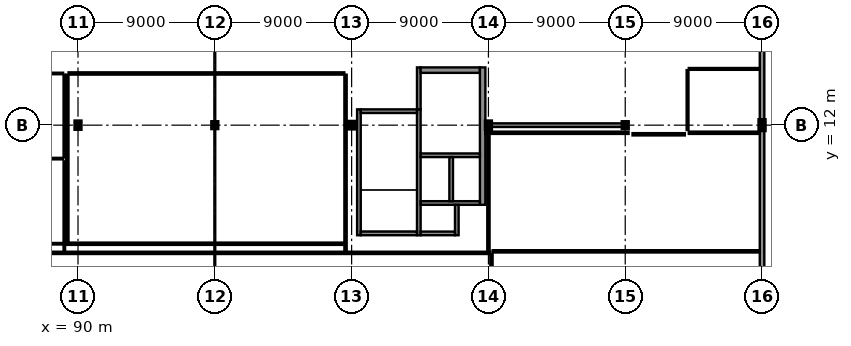
"""IFC4 building model, lengths in metres.
Left out: names, types, materials, properties, quantities, classifications, styles, units other than length and angle.
Written with IfcOpenShell. Run it as: python <this file> out.ifc"""

import sys

from ifc_helpers import new_model, si_unit, direction, frame, frame_2d, origin, origin_2d, place, context, subcontext, project, spatial, rectangle, i_section, extrude, element, fill, save


model = new_model("IFC4")
c1 = context("Model", 3, precision=1e-05, world=origin(), true_north=direction((0.0, 1.0)))
c2 = subcontext(c1, "Body", "Model", "MODEL_VIEW")
j1 = project(units=[si_unit("LENGTHUNIT", "METRE"), si_unit("PLANEANGLEUNIT", "RADIAN")], contexts=[c1])
p1 = place(None, origin())
s1 = spatial("IfcSite", under=j1, at=p1, CompositionType="ELEMENT")
p2 = place(p1, origin())
s2 = spatial("IfcBuilding", under=s1, at=p2, CompositionType="ELEMENT")
p3 = place(p2, frame((0.0, 0.0, 9.9)))
s3 = spatial("IfcBuildingStorey", under=s2, at=p3, CompositionType="ELEMENT", Elevation=9.9)
p4 = place(p3, frame((90.0, 12.0, 0.0), z_axis=(0.0, 0.0, 1.0), x_axis=(1.0, 0.0, 0.0)))
e1 = element("IfcColumn", 1, at=p4, inside=s3, PredefinedType="COLUMN", context=c2, shape_type="SweptSolid", body=[
    extrude(i_section(OverallWidth=0.3, OverallDepth=0.45, WebThickness=0.014, FlangeThickness=0.026, at=origin_2d()), origin(), (0.0, 0.0, 1.0), 4.5),
])
p5 = place(p3, frame((99.0, 12.0, 0.0), z_axis=(0.0, 0.0, 1.0), x_axis=(1.0, 0.0, 0.0)))
e2 = element("IfcColumn", 2, at=p5, inside=s3, PredefinedType="COLUMN", context=c2, shape_type="SweptSolid", body=[
    extrude(i_section(OverallWidth=0.3, OverallDepth=0.36, WebThickness=0.012, FlangeThickness=0.022, at=origin_2d()), origin(), (0.0, 0.0, 1.0), 4.5),
])
p6 = place(p3, frame((108.0, 12.0, 0.0), z_axis=(0.0, 0.0, 1.0), x_axis=(1.0, 0.0, 0.0)))
e3 = element("IfcColumn", 3, at=p6, inside=s3, PredefinedType="COLUMN", context=c2, shape_type="SweptSolid", body=[
    extrude(i_section(OverallWidth=0.3, OverallDepth=0.4, WebThickness=0.013, FlangeThickness=0.024, at=origin_2d()), origin(), (0.0, 0.0, 1.0), 4.5),
])
p7 = place(p3, frame((117.0, 12.0, 0.0), z_axis=(0.0, 0.0, 1.0), x_axis=(0.0, 1.0, 0.0)))
e4 = element("IfcColumn", 4, at=p7, inside=s3, PredefinedType="COLUMN", context=c2, shape_type="SweptSolid", body=[
    extrude(i_section(OverallWidth=0.3, OverallDepth=0.45, WebThickness=0.014, FlangeThickness=0.026, at=origin_2d()), origin(), (0.0, 0.0, 1.0), 4.5),
])
p8 = place(p3, frame((126.0, 12.0, 0.0), z_axis=(0.0, 0.0, 1.0), x_axis=(1.0, 0.0, 0.0)))
e5 = element("IfcColumn", 5, at=p8, inside=s3, PredefinedType="COLUMN", context=c2, shape_type="SweptSolid", body=[
    extrude(i_section(OverallWidth=0.3, OverallDepth=0.36, WebThickness=0.012, FlangeThickness=0.022, at=origin_2d()), origin(), (0.0, 0.0, 1.0), 4.5),
])
p9 = place(p3, frame((135.0, 12.0, 0.0), z_axis=(0.0, 0.0, 1.0), x_axis=(1.0, 0.0, 0.0)))
e6 = element("IfcColumn", 6, at=p9, inside=s3, PredefinedType="COLUMN", context=c2, shape_type="SweptSolid", body=[
    extrude(i_section(OverallWidth=0.305, OverallDepth=0.62, WebThickness=0.021, FlangeThickness=0.04, at=origin_2d()), origin(), (0.0, 0.0, 1.0), 4.5),
])
p10 = place(p3, frame((135.0, 0.008, 0.0), z_axis=(0.0, 0.0, 1.0), x_axis=(0.0, 1.0, 0.0)))
e7 = element("IfcWall", 7, at=p10, inside=s3, PredefinedType="SOLIDWALL", context=c2, shape_type="SweptSolid", body=[
    extrude(rectangle(XDim=11.684, YDim=0.3, at=frame_2d((5.842, 0.0))), origin(), (0.0, 0.0, 1.0), 3.825),
])
p11 = place(p10, frame((1.452, 0.0, 0.8)))
e8 = element("IfcOpeningElement", 8, at=p11, cuts=e7, PredefinedType="OPENING", context=c2, shape_type="SweptSolid", body=[
    extrude(rectangle(XDim=2.0, YDim=2.0, at=frame_2d((1.0, 1.0))), frame((0.0, 0.165, 0.0), z_axis=(0.0, -1.0, 0.0), x_axis=(1.0, 0.0, 0.0)), (0.0, 0.0, 1.0), 0.33),
])
p12 = place(p10, frame((7.412, 0.0, 0.8)))
e9 = element("IfcOpeningElement", 9, at=p12, cuts=e7, PredefinedType="OPENING", context=c2, shape_type="SweptSolid", body=[
    extrude(rectangle(XDim=2.0, YDim=2.0, at=frame_2d((1.0, 1.0))), frame((0.0, 0.165, 0.0), z_axis=(0.0, -1.0, 0.0), x_axis=(1.0, 0.0, 0.0)), (0.0, 0.0, 1.0), 0.33),
])
p13 = place(p3, frame((135.0, 12.308, 0.0), z_axis=(0.0, 0.0, 1.0), x_axis=(0.0, 1.0, 0.0)))
e10 = element("IfcWall", 10, at=p13, inside=s3, PredefinedType="SOLIDWALL", context=c2, shape_type="SweptSolid", body=[
    extrude(rectangle(XDim=11.336, YDim=0.3, at=frame_2d((5.668, 0.0))), origin(), (0.0, 0.0, 1.0), 3.825),
])
p14 = place(p13, frame((3.732, 0.0, 0.8)))
e11 = element("IfcOpeningElement", 11, at=p14, cuts=e10, PredefinedType="OPENING", context=c2, shape_type="SweptSolid", body=[
    extrude(rectangle(XDim=2.0, YDim=2.0, at=frame_2d((1.0, 1.0))), frame((0.0, 0.165, 0.0), z_axis=(0.0, -1.0, 0.0), x_axis=(1.0, 0.0, 0.0)), (0.0, 0.0, 1.0), 0.33),
])
p15 = place(p13, frame((7.162, 0.0, 0.8)))
e12 = element("IfcOpeningElement", 12, at=p15, cuts=e10, PredefinedType="OPENING", context=c2, shape_type="SweptSolid", body=[
    extrude(rectangle(XDim=2.0, YDim=2.0, at=frame_2d((1.0, 1.0))), frame((0.0, 0.165, 0.0), z_axis=(0.0, -1.0, 0.0), x_axis=(1.0, 0.0, 0.0)), (0.0, 0.0, 1.0), 0.33),
])
p16 = place(p3, frame((108.48, 4.76, 0.0), z_axis=(0.0, 0.0, 1.0), x_axis=(0.0, 1.0, 0.0)))
e13 = element("IfcWall", 13, at=p16, inside=s3, PredefinedType="SHEAR", context=c2, shape_type="SweptSolid", body=[
    extrude(rectangle(XDim=8.28, YDim=0.24, at=frame_2d((4.14, 0.0))), origin(), (0.0, 0.0, 1.0), 4.31),
])
p17 = place(p3, frame((112.42, 4.76, 0.0), z_axis=(0.0, 0.0, 1.0), x_axis=(0.0, 1.0, 0.0)))
e14 = element("IfcWall", 14, at=p17, inside=s3, PredefinedType="SHEAR", context=c2, shape_type="SweptSolid", body=[
    extrude(rectangle(XDim=8.28, YDim=0.24, at=frame_2d((4.14, 0.0))), origin(), (0.0, 0.0, 1.0), 4.31),
])
p18 = place(p17, frame((6.49, 0.0, 0.0)))
e15 = element("IfcOpeningElement", 15, at=p18, cuts=e14, PredefinedType="OPENING", context=c2, shape_type="SweptSolid", body=[
    extrude(rectangle(XDim=1.3, YDim=2.2, at=frame_2d((0.65, 1.1))), frame((0.0, 0.135, 0.0), z_axis=(0.0, -1.0, 0.0), x_axis=(1.0, 0.0, 0.0)), (0.0, 0.0, 1.0), 0.27),
])
for number, where, z_axis, x_axis in (
    (16, (108.6, 4.88, 0.0), (0.0, 0.0, 1.0), (1.0, 0.0, 0.0)),
    (17, (108.6, 12.92, 0.0), (0.0, 0.0, 1.0), (1.0, 0.0, 0.0)),
):
    element("IfcWall", number, at=place(p3, frame(where, z_axis=z_axis, x_axis=x_axis)), inside=s3, PredefinedType="SHEAR", context=c2, shape_type="SweptSolid", body=[
        extrude(rectangle(XDim=3.7, YDim=0.24, at=frame_2d((1.85, 0.0))), origin(), (0.0, 0.0, 1.0), 4.31),
    ])
p19 = place(p3, frame((112.42, 13.04, 0.0), z_axis=(0.0, 0.0, 1.0), x_axis=(0.0, 1.0, 0.0)))
e18 = element("IfcWall", 18, at=p19, inside=s3, PredefinedType="SHEAR", context=c2, shape_type="SweptSolid", body=[
    extrude(rectangle(XDim=2.76, YDim=0.24, at=frame_2d((1.38, 0.0))), origin(), (0.0, 0.0, 1.0), 4.16),
])
p20 = place(p3, frame((112.54, 15.62, 0.0), z_axis=(0.0, 0.0, 1.0), x_axis=(1.0, 0.0, 0.0)))
e19 = element("IfcWall", 19, at=p20, inside=s3, PredefinedType="SHEAR", context=c2, shape_type="SweptSolid", body=[
    extrude(rectangle(XDim=3.9, YDim=0.36, at=frame_2d((1.95, 0.0))), origin(), (0.0, 0.0, 1.0), 4.16),
])
p21 = place(p20, frame((1.15, 0.0, 0.0)))
e20 = element("IfcOpeningElement", 20, at=p21, cuts=e19, PredefinedType="OPENING", context=c2, shape_type="SweptSolid", body=[
    extrude(rectangle(XDim=1.6, YDim=2.25, at=frame_2d((0.8, 1.125))), frame((0.0, 0.195, 0.0), z_axis=(0.0, -1.0, 0.0), x_axis=(1.0, 0.0, 0.0)), (0.0, 0.0, 1.0), 0.39),
])
p22 = place(p3, frame((116.62, 6.76, 0.0), z_axis=(0.0, 0.0, 1.0), x_axis=(0.0, 1.0, 0.0)))
e21 = element("IfcWall", 21, at=p22, inside=s3, PredefinedType="SHEAR", context=c2, shape_type="SweptSolid", body=[
    extrude(rectangle(XDim=9.04, YDim=0.36, at=frame_2d((4.52, 0.0))), origin(), (0.0, 0.0, 1.0), 4.16),
])
p23 = place(p3, frame((112.54, 10.02, 0.0), z_axis=(0.0, 0.0, 1.0), x_axis=(1.0, 0.0, 0.0)))
e22 = element("IfcWall", 22, at=p23, inside=s3, PredefinedType="SHEAR", context=c2, shape_type="SweptSolid", body=[
    extrude(rectangle(XDim=3.9, YDim=0.24, at=frame_2d((1.95, 0.0))), origin(), (0.0, 0.0, 1.0), 4.31),
])
p24 = place(p23, frame((0.235, 0.0, 0.0)))
e23 = element("IfcOpeningElement", 23, at=p24, cuts=e22, PredefinedType="OPENING", context=c2, shape_type="SweptSolid", body=[
    extrude(rectangle(XDim=1.6, YDim=2.3, at=frame_2d((0.8, 1.15))), frame((0.0, 0.135, 0.0), z_axis=(0.0, -1.0, 0.0), x_axis=(1.0, 0.0, 0.0)), (0.0, 0.0, 1.0), 0.27),
])
p25 = place(p23, frame((2.185, 0.0, 0.0)))
e24 = element("IfcOpeningElement", 24, at=p25, cuts=e22, PredefinedType="OPENING", context=c2, shape_type="SweptSolid", body=[
    extrude(rectangle(XDim=1.6, YDim=2.3, at=frame_2d((0.8, 1.15))), frame((0.0, 0.135, 0.0), z_axis=(0.0, -1.0, 0.0), x_axis=(1.0, 0.0, 0.0)), (0.0, 0.0, 1.0), 0.27),
])
p26 = place(p3, frame((112.54, 6.88, 0.0), z_axis=(0.0, 0.0, 1.0), x_axis=(1.0, 0.0, 0.0)))
e25 = element("IfcWall", 25, at=p26, inside=s3, PredefinedType="SHEAR", context=c2, shape_type="SweptSolid", body=[
    extrude(rectangle(XDim=3.9, YDim=0.24, at=frame_2d((1.95, 0.0))), origin(), (0.0, 0.0, 1.0), 4.31),
])
p27 = place(p3, frame((114.55, 7.0, 0.0), z_axis=(0.0, 0.0, 1.0), x_axis=(0.0, 1.0, 0.0)))
e26 = element("IfcWall", 26, at=p27, inside=s3, PredefinedType="SHEAR", context=c2, shape_type="SweptSolid", body=[
    extrude(rectangle(XDim=2.9, YDim=0.24, at=frame_2d((1.45, 0.0))), origin(), (0.0, 0.0, 1.0), 4.31),
])
p28 = place(p3, frame((114.92, 4.76, 0.0), z_axis=(0.0, 0.0, 1.0), x_axis=(0.0, 1.0, 0.0)))
e27 = element("IfcWall", 27, at=p28, inside=s3, PredefinedType="SHEAR", context=c2, shape_type="SweptSolid", body=[
    extrude(rectangle(XDim=2.0, YDim=0.24, at=frame_2d((1.0, 0.0))), origin(), (0.0, 0.0, 1.0), 4.31),
])
p29 = place(p3, frame((112.54, 4.88, 0.0), z_axis=(0.0, 0.0, 1.0), x_axis=(1.0, 0.0, 0.0)))
e28 = element("IfcWall", 28, at=p29, inside=s3, PredefinedType="SHEAR", context=c2, shape_type="SweptSolid", body=[
    extrude(rectangle(XDim=2.26, YDim=0.24, at=frame_2d((1.13, 0.0))), origin(), (0.0, 0.0, 1.0), 4.31),
])
p30 = place(p3, frame((117.223, 12.0, 0.0), z_axis=(0.0, 0.0, 1.0), x_axis=(1.0, 0.0, 0.0)))
e29 = element("IfcWall", 29, at=p30, inside=s3, PredefinedType="SHEAR", context=c2, shape_type="SweptSolid", body=[
    extrude(rectangle(XDim=8.769, YDim=0.24, at=frame_2d((4.385, 0.0))), origin(), (0.0, 0.0, 1.0), 3.675),
])
p31 = place(p3, frame((46.08, 3.6, 0.0), z_axis=(0.0, 0.0, 1.0), x_axis=(1.0, 0.0, 0.0)))
e30 = element("IfcWall", 30, at=p31, inside=s3, PredefinedType="PARTITIONING", context=c2, shape_type="SweptSolid", body=[
    extrude(rectangle(XDim=71.04, YDim=0.15, at=frame_2d((35.52, 0.0))), origin(), (0.0, 0.0, 1.0), 4.14),
])
p32 = place(p31, frame((27.595, 0.0, 0.0)))
e31 = element("IfcOpeningElement", 31, at=p32, cuts=e30, PredefinedType="OPENING", context=c2, shape_type="SweptSolid", body=[
    extrude(rectangle(XDim=1.05, YDim=2.25, at=frame_2d((0.525, 1.125))), frame((0.0, 0.09, 0.0), z_axis=(0.0, -1.0, 0.0), x_axis=(1.0, 0.0, 0.0)), (0.0, 0.0, 1.0), 0.18),
])
p33 = place(p3, frame((117.2, 3.52, 0.0), z_axis=(0.0, 0.0, 1.0), x_axis=(0.0, -1.0, 0.0)))
e32 = element("IfcWall", 32, at=p33, inside=s3, PredefinedType="PARTITIONING", context=c2, shape_type="SweptSolid", body=[
    extrude(rectangle(XDim=3.322, YDim=0.15, at=frame_2d((1.661, 0.0))), origin(), (0.0, 0.0, 1.0), 3.625),
])
p34 = place(p3, frame((130.18, 11.5, 0.0), z_axis=(0.0, 0.0, 1.0), x_axis=(1.0, 0.0, 0.0)))
e33 = element("IfcWall", 33, at=p34, inside=s3, PredefinedType="PARTITIONING", context=c2, shape_type="SweptSolid", body=[
    extrude(rectangle(XDim=4.675, YDim=0.15, at=frame_2d((2.337, 0.0))), origin(), (0.0, 0.0, 1.0), 4.14),
])
p35 = place(p3, frame((134.855, 3.7, 0.0), z_axis=(0.0, 0.0, 1.0), x_axis=(-1.0, 0.0, 0.0)))
e34 = element("IfcWall", 34, at=p35, inside=s3, PredefinedType="PARTITIONING", context=c2, shape_type="SweptSolid", body=[
    extrude(rectangle(XDim=17.575, YDim=0.15, at=frame_2d((8.788, 0.0))), origin(), (0.0, 0.0, 1.0), 4.14),
])
p36 = place(p3, frame((117.0, 3.67, 0.0), z_axis=(0.0, 0.0, 1.0), x_axis=(0.0, 1.0, 0.0)))
e35 = element("IfcWall", 35, at=p36, inside=s3, PredefinedType="PARTITIONING", context=c2, shape_type="SweptSolid", body=[
    extrude(rectangle(XDim=7.75, YDim=0.15, at=frame_2d((3.875, 0.0))), origin(), (0.0, 0.0, 1.0), 3.625),
])
p37 = place(p3, frame((116.795, 11.5, 0.0), z_axis=(0.0, 0.0, 1.0), x_axis=(1.0, 0.0, 0.0)))
e36 = element("IfcWall", 36, at=p37, inside=s3, PredefinedType="PARTITIONING", context=c2, shape_type="SweptSolid", body=[
    extrude(rectangle(XDim=9.425, YDim=0.15, at=frame_2d((4.712, 0.0))), origin(), (0.0, 0.0, 1.0), 4.14),
])
p38 = place(p3, frame((126.48, 11.4, 0.0), z_axis=(0.0, 0.0, 1.0), x_axis=(1.0, 0.0, 0.0)))
e37 = element("IfcWall", 37, at=p38, inside=s3, PredefinedType="PARTITIONING", context=c2, shape_type="SweptSolid", body=[
    extrude(rectangle(XDim=3.44, YDim=0.15, at=frame_2d((1.72, 0.0))), origin(), (0.0, 0.0, 1.0), 4.14),
])
p39 = place(p38, frame((1.195, 0.0, 0.0)))
e38 = element("IfcOpeningElement", 38, at=p39, cuts=e37, PredefinedType="OPENING", context=c2, shape_type="SweptSolid", body=[
    extrude(rectangle(XDim=1.05, YDim=2.25, at=frame_2d((0.525, 1.125))), frame((0.0, 0.09, 0.0), z_axis=(0.0, -1.0, 0.0), x_axis=(1.0, 0.0, 0.0)), (0.0, 0.0, 1.0), 0.18),
])
p40 = place(p3, frame((130.1, 11.68, 0.0), z_axis=(0.0, 0.0, 1.0), x_axis=(0.0, 1.0, 0.0)))
e39 = element("IfcWall", 39, at=p40, inside=s3, PredefinedType="PARTITIONING", context=c2, shape_type="SweptSolid", body=[
    extrude(rectangle(XDim=3.94, YDim=0.12, at=frame_2d((1.97, 0.0))), origin(), (0.0, 0.0, 1.0), 4.14),
])
p41 = place(p3, frame((130.18, 15.7, 0.0), z_axis=(0.0, 0.0, 1.0), x_axis=(1.0, 0.0, 0.0)))
e40 = element("IfcWall", 40, at=p41, inside=s3, PredefinedType="PARTITIONING", context=c2, shape_type="SweptSolid", body=[
    extrude(rectangle(XDim=4.675, YDim=0.12, at=frame_2d((2.337, 0.0))), origin(), (0.0, 0.0, 1.0), 4.14),
])
p42 = place(p41, frame((1.862, 0.0, 0.0)))
e41 = element("IfcOpeningElement", 41, at=p42, cuts=e40, PredefinedType="OPENING", context=c2, shape_type="SweptSolid", body=[
    extrude(rectangle(XDim=0.95, YDim=2.15, at=frame_2d((0.475, 1.075))), frame((0.0, 0.075, 0.0), z_axis=(0.0, -1.0, 0.0), x_axis=(1.0, 0.0, 0.0)), (0.0, 0.0, 1.0), 0.15),
])
p43 = place(p3, frame((86.48, 15.4, 0.0), z_axis=(0.0, 0.0, 1.0), x_axis=(1.0, 0.0, 0.0)))
e42 = element("IfcWall", 42, at=p43, inside=s3, PredefinedType="PARTITIONING", context=c2, shape_type="SweptSolid", body=[
    extrude(rectangle(XDim=2.54, YDim=0.1, at=frame_2d((1.27, 0.0))), origin(), (0.0, 0.0, 1.0), 4.14),
])
p44 = place(p3, frame((89.1, 15.32, 0.0), z_axis=(0.0, 0.0, 1.0), x_axis=(0.0, -1.0, 0.0)))
e43 = element("IfcWall", 43, at=p44, inside=s3, PredefinedType="PARTITIONING", context=c2, shape_type="SweptSolid", body=[
    extrude(rectangle(XDim=5.44, YDim=0.1, at=frame_2d((2.72, 0.0))), origin(), (0.0, 0.0, 1.0), 4.14),
])
p45 = place(p3, frame((89.02, 9.8, 0.0), z_axis=(0.0, 0.0, 1.0), x_axis=(-1.0, 0.0, 0.0)))
e44 = element("IfcWall", 44, at=p45, inside=s3, PredefinedType="PARTITIONING", context=c2, shape_type="SweptSolid", body=[
    extrude(rectangle(XDim=2.54, YDim=0.1, at=frame_2d((1.27, 0.0))), origin(), (0.0, 0.0, 1.0), 4.14),
])
p46 = place(p3, frame((89.1, 9.62, 0.0), z_axis=(0.0, 0.0, 1.0), x_axis=(0.0, -1.0, 0.0)))
e45 = element("IfcWall", 45, at=p46, inside=s3, PredefinedType="PARTITIONING", context=c2, shape_type="SweptSolid", body=[
    extrude(rectangle(XDim=5.95, YDim=0.1, at=frame_2d((2.975, 0.0))), origin(), (0.0, 0.0, 1.0), 4.14),
])
p47 = place(p3, frame((89.055, 4.2, 0.0), z_axis=(0.0, 0.0, 1.0), x_axis=(-1.0, 0.0, 0.0)))
e46 = element("IfcWall", 46, at=p47, inside=s3, PredefinedType="PARTITIONING", context=c2, shape_type="SweptSolid", body=[
    extrude(rectangle(XDim=2.575, YDim=0.1, at=frame_2d((1.288, 0.0))), origin(), (0.0, 0.0, 1.0), 4.14),
])
p48 = place(p3, frame((107.6, 15.32, 0.0), z_axis=(0.0, 0.0, 1.0), x_axis=(0.0, -1.0, 0.0)))
e47 = element("IfcWall", 47, at=p48, inside=s3, PredefinedType="PARTITIONING", context=c2, shape_type="SweptSolid", body=[
    extrude(rectangle(XDim=11.65, YDim=0.15, at=frame_2d((5.825, 0.0))), origin(), (0.0, 0.0, 1.0), 4.14),
])
p49 = place(p3, frame((107.53, 4.2, 0.0), z_axis=(0.0, 0.0, 1.0), x_axis=(-1.0, 0.0, 0.0)))
e48 = element("IfcWall", 48, at=p49, inside=s3, PredefinedType="PARTITIONING", context=c2, shape_type="SweptSolid", body=[
    extrude(rectangle(XDim=18.385, YDim=0.15, at=frame_2d((9.192, 0.0))), origin(), (0.0, 0.0, 1.0), 4.14),
])
p50 = place(p3, frame((89.3, 4.27, 0.0), z_axis=(0.0, 0.0, 1.0), x_axis=(0.0, 1.0, 0.0)))
e49 = element("IfcWall", 49, at=p50, inside=s3, PredefinedType="PARTITIONING", context=c2, shape_type="SweptSolid", body=[
    extrude(rectangle(XDim=11.05, YDim=0.15, at=frame_2d((5.525, 0.0))), origin(), (0.0, 0.0, 1.0), 4.14),
])
p51 = place(p3, frame((89.38, 15.4, 0.0), z_axis=(0.0, 0.0, 1.0), x_axis=(1.0, 0.0, 0.0)))
e50 = element("IfcWall", 50, at=p51, inside=s3, PredefinedType="PARTITIONING", context=c2, shape_type="SweptSolid", body=[
    extrude(rectangle(XDim=18.14, YDim=0.15, at=frame_2d((9.07, 0.0))), origin(), (0.0, 0.0, 1.0), 4.14),
])
p52 = place(p51, frame((8.545, 0.0, 0.0)))
e51 = element("IfcOpeningElement", 51, at=p52, cuts=e50, PredefinedType="OPENING", context=c2, shape_type="SweptSolid", body=[
    extrude(rectangle(XDim=1.05, YDim=2.25, at=frame_2d((0.525, 1.125))), frame((0.0, 0.09, 0.0), z_axis=(0.0, -1.0, 0.0), x_axis=(1.0, 0.0, 0.0)), (0.0, 0.0, 1.0), 0.18),
])
p53 = place(p11, origin())
e52 = element("IfcWindow", 52, at=p53, inside=s3, PartitioningType="SINGLE_PANEL", PredefinedType="WINDOW", context=c2, shape_type="SweptSolid", body=[
    extrude(rectangle(XDim=2.0, YDim=2.0, at=frame_2d((1.0, 1.0))), frame((0.0, 0.03, 0.0), z_axis=(0.0, -1.0, 0.0), x_axis=(1.0, 0.0, 0.0)), (0.0, 0.0, 1.0), 0.06),
])
fill(e8, e52)
p54 = place(p12, origin())
e53 = element("IfcWindow", 53, at=p54, inside=s3, PartitioningType="SINGLE_PANEL", PredefinedType="WINDOW", context=c2, shape_type="SweptSolid", body=[
    extrude(rectangle(XDim=2.0, YDim=2.0, at=frame_2d((1.0, 1.0))), frame((0.0, 0.03, 0.0), z_axis=(0.0, -1.0, 0.0), x_axis=(1.0, 0.0, 0.0)), (0.0, 0.0, 1.0), 0.06),
])
fill(e9, e53)
p55 = place(p14, origin())
e54 = element("IfcWindow", 54, at=p55, inside=s3, PartitioningType="SINGLE_PANEL", PredefinedType="WINDOW", context=c2, shape_type="SweptSolid", body=[
    extrude(rectangle(XDim=2.0, YDim=2.0, at=frame_2d((1.0, 1.0))), frame((0.0, 0.03, 0.0), z_axis=(0.0, -1.0, 0.0), x_axis=(1.0, 0.0, 0.0)), (0.0, 0.0, 1.0), 0.06),
])
fill(e11, e54)
p56 = place(p18, frame((1.3, 0.0, 0.0), z_axis=(0.0, 0.0, 1.0), x_axis=(-1.0, 0.0, 0.0)))
e55 = element("IfcDoor", 55, at=p56, inside=s3, OperationType="SINGLE_SWING_RIGHT", PredefinedType="DOOR", context=c2, shape_type="SweptSolid", body=[
    extrude(rectangle(XDim=1.3, YDim=2.2, at=frame_2d((0.65, 1.1))), frame((0.0, 0.025, 0.0), z_axis=(0.0, -1.0, 0.0), x_axis=(1.0, 0.0, 0.0)), (0.0, 0.0, 1.0), 0.05),
])
fill(e15, e55)
p57 = place(p21, origin())
e56 = element("IfcDoor", 56, at=p57, inside=s3, OperationType="DOUBLE_DOOR_SINGLE_SWING", PredefinedType="DOOR", context=c2, shape_type="SweptSolid", body=[
    extrude(rectangle(XDim=1.6, YDim=2.25, at=frame_2d((0.8, 1.125))), frame((0.0, 0.025, 0.0), z_axis=(0.0, -1.0, 0.0), x_axis=(1.0, 0.0, 0.0)), (0.0, 0.0, 1.0), 0.05),
])
fill(e20, e56)
p58 = place(p24, origin())
e57 = element("IfcDoor", 57, at=p58, inside=s3, OperationType="DOUBLE_DOOR_SLIDING", PredefinedType="DOOR", context=c2, shape_type="SweptSolid", body=[
    extrude(rectangle(XDim=1.6, YDim=2.3, at=frame_2d((0.8, 1.15))), frame((0.0, 0.025, 0.0), z_axis=(0.0, -1.0, 0.0), x_axis=(1.0, 0.0, 0.0)), (0.0, 0.0, 1.0), 0.05),
])
fill(e23, e57)
p59 = place(p25, origin())
e58 = element("IfcDoor", 58, at=p59, inside=s3, OperationType="DOUBLE_DOOR_SLIDING", PredefinedType="DOOR", context=c2, shape_type="SweptSolid", body=[
    extrude(rectangle(XDim=1.6, YDim=2.3, at=frame_2d((0.8, 1.15))), frame((0.0, 0.025, 0.0), z_axis=(0.0, -1.0, 0.0), x_axis=(1.0, 0.0, 0.0)), (0.0, 0.0, 1.0), 0.05),
])
fill(e24, e58)
p60 = place(p39, origin())
e59 = element("IfcDoor", 59, at=p60, inside=s3, OperationType="SINGLE_SWING_LEFT", PredefinedType="DOOR", context=c2, shape_type="SweptSolid", body=[
    extrude(rectangle(XDim=1.05, YDim=2.25, at=frame_2d((0.525, 1.125))), frame((0.0, 0.025, 0.0), z_axis=(0.0, -1.0, 0.0), x_axis=(1.0, 0.0, 0.0)), (0.0, 0.0, 1.0), 0.05),
])
fill(e38, e59)
p61 = place(p42, frame((0.95, 0.0, 0.0), z_axis=(0.0, 0.0, 1.0), x_axis=(-1.0, 0.0, 0.0)))
e60 = element("IfcDoor", 60, at=p61, inside=s3, OperationType="SINGLE_SWING_RIGHT", PredefinedType="DOOR", context=c2, shape_type="SweptSolid", body=[
    extrude(rectangle(XDim=0.95, YDim=2.15, at=frame_2d((0.475, 1.075))), frame((0.0, 0.025, 0.0), z_axis=(0.0, -1.0, 0.0), x_axis=(1.0, 0.0, 0.0)), (0.0, 0.0, 1.0), 0.05),
])
fill(e41, e60)
p62 = place(p52, origin())
e61 = element("IfcDoor", 61, at=p62, inside=s3, OperationType="SINGLE_SWING_LEFT", PredefinedType="DOOR", context=c2, shape_type="SweptSolid", body=[
    extrude(rectangle(XDim=1.05, YDim=2.25, at=frame_2d((0.525, 1.125))), frame((0.0, 0.025, 0.0), z_axis=(0.0, -1.0, 0.0), x_axis=(1.0, 0.0, 0.0)), (0.0, 0.0, 1.0), 0.05),
])
fill(e51, e61)
save(model, sys.argv[1])
